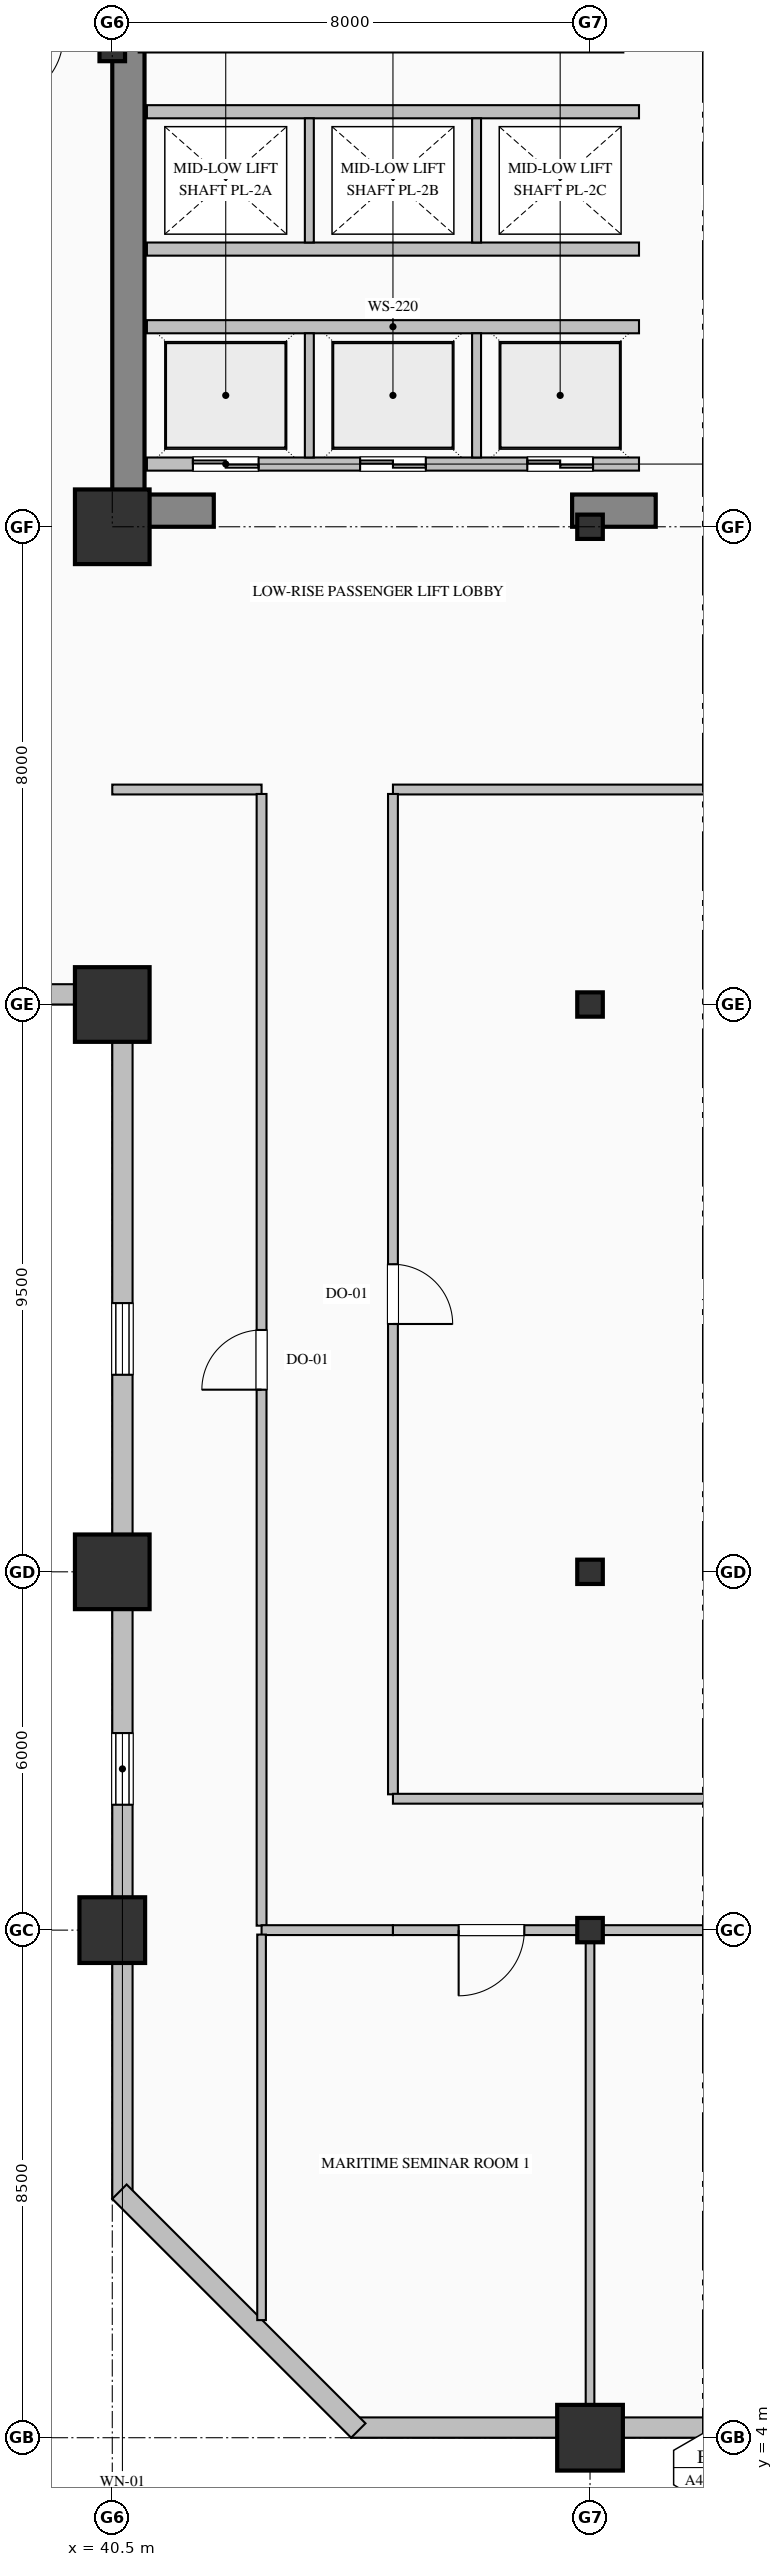
"""IFC4 building model, lengths in metres.
Left out: names, types, materials, properties, quantities, classifications, styles, units other than length and angle.
Written with IfcOpenShell. Run it as: python <this file> out.ifc"""

import sys

from ifc_helpers import new_model, si_unit, direction, frame, frame_2d, origin, origin_2d, place, context, subcontext, project, spatial, rectangle, hollow_rectangle, i_section, extrude, element, fill, save


model = new_model("IFC4")
c1 = context("Model", 3, precision=1e-05, world=origin(), true_north=direction((0.0, 1.0)))
c2 = subcontext(c1, "Body", "Model", "MODEL_VIEW")
j1 = project(units=[si_unit("LENGTHUNIT", "METRE"), si_unit("PLANEANGLEUNIT", "RADIAN")], contexts=[c1])
p1 = place(None, origin())
s1 = spatial("IfcSite", under=j1, at=p1, CompositionType="ELEMENT")
p2 = place(p1, origin())
s2 = spatial("IfcBuilding", under=s1, at=p2, CompositionType="ELEMENT")
p3 = place(p2, frame((0.0, 0.0, 44.2)))
s3 = spatial("IfcBuildingStorey", under=s2, at=p3, CompositionType="ELEMENT", Elevation=44.2)
p4 = place(p3, frame((40.77, 36.54, 0.0), z_axis=(0.0, 0.0, 1.0), x_axis=(0.0, 1.0, 0.0)))
e1 = element("IfcWall", 1, at=p4, inside=s3, PredefinedType="SHEAR", context=c2, shape_type="SweptSolid", body=[
    extrude(rectangle(XDim=7.86, YDim=0.54, at=frame_2d((3.93, 0.0))), origin(), (0.0, 0.0, 1.0), 3.75),
])
p5 = place(p3, frame((40.5, 36.27, 0.0), z_axis=(0.0, 0.0, 1.0), x_axis=(1.0, 0.0, 0.0)))
e2 = element("IfcWall", 2, at=p5, inside=s3, PredefinedType="SHEAR", context=c2, shape_type="SweptSolid", body=[
    extrude(rectangle(XDim=1.7, YDim=0.54, at=frame_2d((0.85, 0.0))), origin(), (0.0, 0.0, 1.0), 3.75),
])
p6 = place(p3, frame((48.2, 36.27, 0.0), z_axis=(0.0, 0.0, 1.0), x_axis=(1.0, 0.0, 0.0)))
e3 = element("IfcWall", 3, at=p6, inside=s3, PredefinedType="SHEAR", context=c2, shape_type="SweptSolid", body=[
    extrude(rectangle(XDim=1.4, YDim=0.54, at=frame_2d((0.7, 0.0))), origin(), (0.0, 0.0, 1.0), 3.75),
])
p7 = place(p3, frame((40.5, 12.5, 0.0), z_axis=(0.0, 0.0, 1.0), x_axis=(1.0, 0.0, 0.0)))
e4 = element("IfcColumn", 4, at=p7, inside=s3, PredefinedType="COLUMN", context=c2, shape_type="SweptSolid", body=[
    extrude(hollow_rectangle(XDim=1.1, YDim=1.1, WallThickness=0.04, at=origin_2d()), origin(), (0.0, 0.0, 1.0), 4.0),
])
for number, where, z_axis, x_axis in (
    (5, (40.5, 18.5, 0.0), (0.0, 0.0, 1.0), (1.0, 0.0, 0.0)),
    (6, (40.5, 28.0, 0.0), (0.0, 0.0, 1.0), (1.0, 0.0, 0.0)),
    (7, (40.5, 36.0, 0.0), (0.0, 0.0, 1.0), (1.0, 0.0, 0.0)),
):
    element("IfcColumn", number, at=place(p3, frame(where, z_axis=z_axis, x_axis=x_axis)), inside=s3, PredefinedType="COLUMN", context=c2, shape_type="SweptSolid", body=[
        extrude(hollow_rectangle(XDim=1.25, YDim=1.25, WallThickness=0.045, at=origin_2d()), origin(), (0.0, 0.0, 1.0), 4.0),
    ])
p8 = place(p3, frame((40.5, 44.0, 0.0), z_axis=(0.0, 0.0, 1.0), x_axis=(1.0, 0.0, 0.0)))
e8 = element("IfcColumn", 8, at=p8, inside=s3, PredefinedType="COLUMN", context=c2, shape_type="SweptSolid", body=[
    extrude(i_section(OverallWidth=0.407, OverallDepth=0.428, WebThickness=0.02, FlangeThickness=0.035, FilletRadius=0.022, at=origin_2d()), origin(), (0.0, 0.0, 1.0), 4.0),
])
p9 = place(p3, frame((48.5, 4.0, 0.0), z_axis=(0.0, 0.0, 1.0), x_axis=(1.0, 0.0, 0.0)))
e9 = element("IfcColumn", 9, at=p9, inside=s3, PredefinedType="COLUMN", context=c2, shape_type="SweptSolid", body=[
    extrude(hollow_rectangle(XDim=1.1, YDim=1.1, WallThickness=0.04, at=origin_2d()), origin(), (0.0, 0.0, 1.0), 4.0),
])
for number, where, z_axis, x_axis in (
    (10, (48.5, 12.5, 0.0), (0.0, 0.0, 1.0), (1.0, 0.0, 0.0)),
    (11, (48.5, 18.5, 0.0), (0.0, 0.0, 1.0), (1.0, 0.0, 0.0)),
    (12, (48.5, 28.0, 0.0), (0.0, 0.0, 1.0), (1.0, 0.0, 0.0)),
    (13, (48.5, 36.0, 0.0), (0.0, 0.0, 1.0), (1.0, 0.0, 0.0)),
):
    element("IfcColumn", number, at=place(p3, frame(where, z_axis=z_axis, x_axis=x_axis)), inside=s3, PredefinedType="COLUMN", context=c2, shape_type="SweptSolid", body=[
        extrude(i_section(OverallWidth=0.407, OverallDepth=0.428, WebThickness=0.02, FlangeThickness=0.035, FilletRadius=0.022, at=origin_2d()), origin(), (0.0, 0.0, 1.0), 4.0),
    ])
p10 = place(p3, frame((40.67, 8.0, 0.0), z_axis=(0.0, 0.0, 1.0), x_axis=(0.0, 1.0, 0.0)))
e14 = element("IfcWall", 14, at=p10, inside=s3, PredefinedType="SOLIDWALL", context=c2, shape_type="SweptSolid", body=[
    extrude(rectangle(XDim=20.34, YDim=0.34, at=frame_2d((10.17, 0.0))), origin(), (0.0, 0.0, 1.0), 3.05),
])
p11 = place(p10, frame((6.6, 0.0, 0.7)))
e15 = element("IfcOpeningElement", 15, at=p11, cuts=e14, PredefinedType="OPENING", context=c2, shape_type="SweptSolid", body=[
    extrude(rectangle(XDim=1.2, YDim=1.85, at=frame_2d((0.6, 0.925))), frame((0.0, 0.18, 0.0), z_axis=(0.0, -1.0, 0.0), x_axis=(1.0, 0.0, 0.0)), (0.0, 0.0, 1.0), 0.36),
])
p12 = place(p10, frame((13.8, 0.0, 0.7)))
e16 = element("IfcOpeningElement", 16, at=p12, cuts=e14, PredefinedType="OPENING", context=c2, shape_type="SweptSolid", body=[
    extrude(rectangle(XDim=1.2, YDim=1.85, at=frame_2d((0.6, 0.925))), frame((0.0, 0.18, 0.0), z_axis=(0.0, -1.0, 0.0), x_axis=(1.0, 0.0, 0.0)), (0.0, 0.0, 1.0), 0.36),
])
p13 = place(p3, frame((40.52, 28.17, 0.0), z_axis=(0.0, 0.0, 1.0), x_axis=(-1.0, 0.0, 0.0)))
e17 = element("IfcWall", 17, at=p13, inside=s3, PredefinedType="SOLIDWALL", context=c2, shape_type="SweptSolid", body=[
    extrude(rectangle(XDim=36.52, YDim=0.34, at=frame_2d((18.26, 0.0))), origin(), (0.0, 0.0, 1.0), 3.05),
])
p14 = place(p13, frame((10.2, 0.0, 0.7)))
e18 = element("IfcOpeningElement", 18, at=p14, cuts=e17, PredefinedType="OPENING", context=c2, shape_type="SweptSolid", body=[
    extrude(rectangle(XDim=1.2, YDim=1.85, at=frame_2d((0.6, 0.925))), frame((0.0, 0.18, 0.0), z_axis=(0.0, -1.0, 0.0), x_axis=(1.0, 0.0, 0.0)), (0.0, 0.0, 1.0), 0.36),
])
p15 = place(p13, frame((13.8, 0.0, 0.7)))
e19 = element("IfcOpeningElement", 19, at=p15, cuts=e17, PredefinedType="OPENING", context=c2, shape_type="SweptSolid", body=[
    extrude(rectangle(XDim=1.2, YDim=1.85, at=frame_2d((0.6, 0.925))), frame((0.0, 0.18, 0.0), z_axis=(0.0, -1.0, 0.0), x_axis=(1.0, 0.0, 0.0)), (0.0, 0.0, 1.0), 0.36),
])
p16 = place(p13, frame((17.4, 0.0, 0.7)))
e20 = element("IfcOpeningElement", 20, at=p16, cuts=e17, PredefinedType="OPENING", context=c2, shape_type="SweptSolid", body=[
    extrude(rectangle(XDim=1.2, YDim=1.85, at=frame_2d((0.6, 0.925))), frame((0.0, 0.18, 0.0), z_axis=(0.0, -1.0, 0.0), x_axis=(1.0, 0.0, 0.0)), (0.0, 0.0, 1.0), 0.36),
])
p17 = place(p13, frame((21.0, 0.0, 0.7)))
e21 = element("IfcOpeningElement", 21, at=p17, cuts=e17, PredefinedType="OPENING", context=c2, shape_type="SweptSolid", body=[
    extrude(rectangle(XDim=1.2, YDim=1.85, at=frame_2d((0.6, 0.925))), frame((0.0, 0.18, 0.0), z_axis=(0.0, -1.0, 0.0), x_axis=(1.0, 0.0, 0.0)), (0.0, 0.0, 1.0), 0.36),
])
p18 = place(p13, frame((28.2, 0.0, 0.7)))
e22 = element("IfcOpeningElement", 22, at=p18, cuts=e17, PredefinedType="OPENING", context=c2, shape_type="SweptSolid", body=[
    extrude(rectangle(XDim=1.2, YDim=1.85, at=frame_2d((0.6, 0.925))), frame((0.0, 0.18, 0.0), z_axis=(0.0, -1.0, 0.0), x_axis=(1.0, 0.0, 0.0)), (0.0, 0.0, 1.0), 0.36),
])
p19 = place(p3, frame((60.0, 4.17, 0.0), z_axis=(0.0, 0.0, 1.0), x_axis=(-1.0, 0.0, 0.0)))
e23 = element("IfcWall", 23, at=p19, inside=s3, PredefinedType="SOLIDWALL", context=c2, shape_type="SweptSolid", body=[
    extrude(rectangle(XDim=15.5, YDim=0.34, at=frame_2d((7.75, 0.0))), origin(), (0.0, 0.0, 1.0), 3.25),
])
p20 = place(p19, frame((6.15, 0.0, 0.85)))
e24 = element("IfcOpeningElement", 24, at=p20, cuts=e23, PredefinedType="OPENING", context=c2, shape_type="SweptSolid", body=[
    extrude(rectangle(XDim=2.1, YDim=2.05, at=frame_2d((1.05, 1.025))), frame((0.0, 0.18, 0.0), z_axis=(0.0, -1.0, 0.0), x_axis=(1.0, 0.0, 0.0)), (0.0, 0.0, 1.0), 0.36),
])
p21 = place(p3, frame((44.62, 4.12, 0.0), z_axis=(0.0, 0.0, 1.0), x_axis=(-0.707106781187, 0.707106781187, 0.0)))
e25 = element("IfcWall", 25, at=p21, inside=s3, PredefinedType="SOLIDWALL", context=c2, shape_type="SweptSolid", body=[
    extrude(rectangle(XDim=5.657, YDim=0.34, at=frame_2d((2.828, 0.0))), origin(), (0.0, 0.0, 1.0), 3.75),
])
p22 = place(p3, frame((49.32, 37.05, 0.0), z_axis=(0.0, 0.0, 1.0), x_axis=(-1.0, 0.0, 0.0)))
e26 = element("IfcWall", 26, at=p22, inside=s3, PredefinedType="PARTITIONING", context=c2, shape_type="SweptSolid", body=[
    extrude(rectangle(XDim=8.24, YDim=0.22, at=frame_2d((4.12, 0.0))), origin(), (0.0, 0.0, 1.0), 3.75),
])
p23 = place(p22, frame((6.37, 0.0, 0.0)))
e27 = element("IfcOpeningElement", 27, at=p23, cuts=e26, PredefinedType="OPENING", context=c2, shape_type="SweptSolid", body=[
    extrude(rectangle(XDim=1.1, YDim=2.2, at=frame_2d((0.55, 1.1))), frame((0.0, 0.12, 0.0), z_axis=(0.0, -1.0, 0.0), x_axis=(1.0, 0.0, 0.0)), (0.0, 0.0, 1.0), 0.24),
])
p24 = place(p22, frame((3.57, 0.0, 0.0)))
e28 = element("IfcOpeningElement", 28, at=p24, cuts=e26, PredefinedType="OPENING", context=c2, shape_type="SweptSolid", body=[
    extrude(rectangle(XDim=1.1, YDim=2.2, at=frame_2d((0.55, 1.1))), frame((0.0, 0.12, 0.0), z_axis=(0.0, -1.0, 0.0), x_axis=(1.0, 0.0, 0.0)), (0.0, 0.0, 1.0), 0.24),
])
p25 = place(p22, frame((0.77, 0.0, 0.0)))
e29 = element("IfcOpeningElement", 29, at=p25, cuts=e26, PredefinedType="OPENING", context=c2, shape_type="SweptSolid", body=[
    extrude(rectangle(XDim=1.1, YDim=2.2, at=frame_2d((0.55, 1.1))), frame((0.0, 0.12, 0.0), z_axis=(0.0, -1.0, 0.0), x_axis=(1.0, 0.0, 0.0)), (0.0, 0.0, 1.0), 0.24),
])
p26 = place(p3, frame((41.08, 39.35, 0.0), z_axis=(0.0, 0.0, 1.0), x_axis=(1.0, 0.0, 0.0)))
e30 = element("IfcWall", 30, at=p26, inside=s3, PredefinedType="PARTITIONING", context=c2, shape_type="SweptSolid", body=[
    extrude(rectangle(XDim=8.24, YDim=0.22, at=frame_2d((4.12, 0.0))), origin(), (0.0, 0.0, 1.0), 3.75),
])
for number, where, z_axis, x_axis in (
    (31, (43.8, 37.16, 0.0), (0.0, 0.0, 1.0), (0.0, 1.0, 0.0)),
    (32, (46.6, 37.16, 0.0), (0.0, 0.0, 1.0), (0.0, 1.0, 0.0)),
):
    element("IfcWall", number, at=place(p3, frame(where, z_axis=z_axis, x_axis=x_axis)), inside=s3, PredefinedType="PARTITIONING", context=c2, shape_type="SweptSolid", body=[
        extrude(rectangle(XDim=2.08, YDim=0.15, at=frame_2d((1.04, 0.0))), origin(), (0.0, 0.0, 1.0), 3.75),
    ])
for number, where, z_axis, x_axis in (
    (33, (49.32, 40.65, 0.0), (0.0, 0.0, 1.0), (-1.0, 0.0, 0.0)),
    (34, (41.08, 42.95, 0.0), (0.0, 0.0, 1.0), (1.0, 0.0, 0.0)),
):
    element("IfcWall", number, at=place(p3, frame(where, z_axis=z_axis, x_axis=x_axis)), inside=s3, PredefinedType="PARTITIONING", context=c2, shape_type="SweptSolid", body=[
        extrude(rectangle(XDim=8.24, YDim=0.22, at=frame_2d((4.12, 0.0))), origin(), (0.0, 0.0, 1.0), 3.75),
    ])
for number, where, z_axis, x_axis in (
    (35, (43.8, 40.76, 0.0), (0.0, 0.0, 1.0), (0.0, 1.0, 0.0)),
    (36, (46.6, 40.76, 0.0), (0.0, 0.0, 1.0), (0.0, 1.0, 0.0)),
):
    element("IfcWall", number, at=place(p3, frame(where, z_axis=z_axis, x_axis=x_axis)), inside=s3, PredefinedType="PARTITIONING", context=c2, shape_type="SweptSolid", body=[
        extrude(rectangle(XDim=2.08, YDim=0.15, at=frame_2d((1.04, 0.0))), origin(), (0.0, 0.0, 1.0), 3.75),
    ])
p27 = place(p3, frame((56.5, 31.6, 0.0), z_axis=(0.0, 0.0, 1.0), x_axis=(-1.0, 0.0, 0.0)))
e37 = element("IfcWall", 37, at=p27, inside=s3, PredefinedType="PARTITIONING", context=c2, shape_type="SweptSolid", body=[
    extrude(rectangle(XDim=11.3, YDim=0.165, at=frame_2d((5.65, 0.0))), origin(), (0.0, 0.0, 1.0), 3.75),
])
p28 = place(p3, frame((43.0, 31.6, 0.0), z_axis=(0.0, 0.0, 1.0), x_axis=(-1.0, 0.0, 0.0)))
e38 = element("IfcWall", 38, at=p28, inside=s3, PredefinedType="PARTITIONING", context=c2, shape_type="SweptSolid", body=[
    extrude(rectangle(XDim=2.5, YDim=0.165, at=frame_2d((1.25, 0.0))), origin(), (0.0, 0.0, 1.0), 3.75),
])
p29 = place(p3, frame((45.2, 31.525, 0.0), z_axis=(0.0, 0.0, 1.0), x_axis=(0.0, -1.0, 0.0)))
e39 = element("IfcWall", 39, at=p29, inside=s3, PredefinedType="PARTITIONING", context=c2, shape_type="SweptSolid", body=[
    extrude(rectangle(XDim=16.751, YDim=0.165, at=frame_2d((8.375, 0.0))), origin(), (0.0, 0.0, 1.0), 3.75),
])
p30 = place(p29, frame((7.875, 0.0, 0.0)))
e40 = element("IfcOpeningElement", 40, at=p30, cuts=e39, PredefinedType="OPENING", context=c2, shape_type="SweptSolid", body=[
    extrude(rectangle(XDim=1.0, YDim=2.15, at=frame_2d((0.5, 1.075))), frame((0.0, 0.093, 0.0), z_axis=(0.0, -1.0, 0.0), x_axis=(1.0, 0.0, 0.0)), (0.0, 0.0, 1.0), 0.185),
])
p31 = place(p3, frame((43.0, 12.574, 0.0), z_axis=(0.0, 0.0, 1.0), x_axis=(0.0, 1.0, 0.0)))
e41 = element("IfcWall", 41, at=p31, inside=s3, PredefinedType="PARTITIONING", context=c2, shape_type="SweptSolid", body=[
    extrude(rectangle(XDim=18.951, YDim=0.165, at=frame_2d((9.476, 0.0))), origin(), (0.0, 0.0, 1.0), 3.75),
])
p32 = place(p31, frame((8.976, 0.0, 0.0)))
e42 = element("IfcOpeningElement", 42, at=p32, cuts=e41, PredefinedType="OPENING", context=c2, shape_type="SweptSolid", body=[
    extrude(rectangle(XDim=1.0, YDim=2.15, at=frame_2d((0.5, 1.075))), frame((0.0, 0.093, 0.0), z_axis=(0.0, -1.0, 0.0), x_axis=(1.0, 0.0, 0.0)), (0.0, 0.0, 1.0), 0.185),
])
p33 = place(p3, frame((45.2, 12.5, 0.0), z_axis=(0.0, 0.0, 1.0), x_axis=(-1.0, 0.0, 0.0)))
e43 = element("IfcWall", 43, at=p33, inside=s3, PredefinedType="PARTITIONING", context=c2, shape_type="SweptSolid", body=[
    extrude(rectangle(XDim=2.2, YDim=0.165, at=frame_2d((1.1, 0.0))), origin(), (0.0, 0.0, 1.0), 3.042),
])
p34 = place(p3, frame((45.2, 14.7, 0.0), z_axis=(0.0, 0.0, 1.0), x_axis=(1.0, 0.0, 0.0)))
e44 = element("IfcWall", 44, at=p34, inside=s3, PredefinedType="PARTITIONING", context=c2, shape_type="SweptSolid", body=[
    extrude(rectangle(XDim=16.3, YDim=0.165, at=frame_2d((8.15, 0.0))), origin(), (0.0, 0.0, 1.0), 3.75),
])
p35 = place(p3, frame((48.5, 12.5, 0.0), z_axis=(0.0, 0.0, 1.0), x_axis=(-1.0, 0.0, 0.0)))
e45 = element("IfcWall", 45, at=p35, inside=s3, PredefinedType="PARTITIONING", context=c2, shape_type="SweptSolid", body=[
    extrude(rectangle(XDim=3.3, YDim=0.165, at=frame_2d((1.65, 0.0))), origin(), (0.0, 0.0, 1.0), 3.042),
])
p36 = place(p35, frame((1.1, 0.0, 0.0)))
e46 = element("IfcOpeningElement", 46, at=p36, cuts=e45, PredefinedType="OPENING", context=c2, shape_type="SweptSolid", body=[
    extrude(rectangle(XDim=1.1, YDim=2.2, at=frame_2d((0.55, 1.1))), frame((0.0, 0.093, 0.0), z_axis=(0.0, -1.0, 0.0), x_axis=(1.0, 0.0, 0.0)), (0.0, 0.0, 1.0), 0.185),
])
p37 = place(p3, frame((56.5, 12.5, 0.0), z_axis=(0.0, 0.0, 1.0), x_axis=(-1.0, 0.0, 0.0)))
e47 = element("IfcWall", 47, at=p37, inside=s3, PredefinedType="PARTITIONING", context=c2, shape_type="SweptSolid", body=[
    extrude(rectangle(XDim=8.0, YDim=0.165, at=frame_2d((4.0, 0.0))), origin(), (0.0, 0.0, 1.0), 3.042),
])
p38 = place(p37, frame((3.45, 0.0, 0.0)))
e48 = element("IfcOpeningElement", 48, at=p38, cuts=e47, PredefinedType="OPENING", context=c2, shape_type="SweptSolid", body=[
    extrude(rectangle(XDim=1.1, YDim=2.2, at=frame_2d((0.55, 1.1))), frame((0.0, 0.093, 0.0), z_axis=(0.0, -1.0, 0.0), x_axis=(1.0, 0.0, 0.0)), (0.0, 0.0, 1.0), 0.185),
])
p39 = place(p3, frame((43.0, 12.426, 0.0), z_axis=(0.0, 0.0, 1.0), x_axis=(0.0, -1.0, 0.0)))
e49 = element("IfcWall", 49, at=p39, inside=s3, PredefinedType="PARTITIONING", context=c2, shape_type="SweptSolid", body=[
    extrude(rectangle(XDim=6.456, YDim=0.145, at=frame_2d((3.228, 0.0))), origin(), (0.0, 0.0, 1.0), 3.75),
])
p40 = place(p3, frame((48.5, 12.426, 0.0), z_axis=(0.0, 0.0, 1.0), x_axis=(0.0, -1.0, 0.0)))
e50 = element("IfcWall", 50, at=p40, inside=s3, PredefinedType="PARTITIONING", context=c2, shape_type="SweptSolid", body=[
    extrude(rectangle(XDim=8.094, YDim=0.145, at=frame_2d((4.047, 0.0))), origin(), (0.0, 0.0, 1.0), 3.042),
])
p41 = place(p11, origin())
e51 = element("IfcWindow", 51, at=p41, inside=s3, PartitioningType="DOUBLE_PANEL_VERTICAL", PredefinedType="WINDOW", context=c2, shape_type="SweptSolid", body=[
    extrude(rectangle(XDim=1.2, YDim=1.85, at=frame_2d((0.6, 0.925))), frame((0.0, 0.15, 0.0), z_axis=(0.0, -1.0, 0.0), x_axis=(1.0, 0.0, 0.0)), (0.0, 0.0, 1.0), 0.06),
])
fill(e15, e51)
p42 = place(p12, origin())
e52 = element("IfcWindow", 52, at=p42, inside=s3, PartitioningType="DOUBLE_PANEL_VERTICAL", PredefinedType="WINDOW", context=c2, shape_type="SweptSolid", body=[
    extrude(rectangle(XDim=1.2, YDim=1.85, at=frame_2d((0.6, 0.925))), frame((0.0, 0.15, 0.0), z_axis=(0.0, -1.0, 0.0), x_axis=(1.0, 0.0, 0.0)), (0.0, 0.0, 1.0), 0.06),
])
fill(e16, e52)
p43 = place(p23, origin())
e53 = element("IfcDoor", 53, at=p43, inside=s3, OperationType="DOUBLE_DOOR_SLIDING", PredefinedType="DOOR", context=c2, shape_type="SweptSolid", body=[
    extrude(rectangle(XDim=1.1, YDim=2.2, at=frame_2d((0.55, 1.1))), frame((0.0, 0.025, 0.0), z_axis=(0.0, -1.0, 0.0), x_axis=(1.0, 0.0, 0.0)), (0.0, 0.0, 1.0), 0.05),
])
fill(e27, e53)
p44 = place(p24, origin())
e54 = element("IfcDoor", 54, at=p44, inside=s3, OperationType="DOUBLE_DOOR_SLIDING", PredefinedType="DOOR", context=c2, shape_type="SweptSolid", body=[
    extrude(rectangle(XDim=1.1, YDim=2.2, at=frame_2d((0.55, 1.1))), frame((0.0, 0.025, 0.0), z_axis=(0.0, -1.0, 0.0), x_axis=(1.0, 0.0, 0.0)), (0.0, 0.0, 1.0), 0.05),
])
fill(e28, e54)
p45 = place(p25, origin())
e55 = element("IfcDoor", 55, at=p45, inside=s3, OperationType="DOUBLE_DOOR_SLIDING", PredefinedType="DOOR", context=c2, shape_type="SweptSolid", body=[
    extrude(rectangle(XDim=1.1, YDim=2.2, at=frame_2d((0.55, 1.1))), frame((0.0, 0.025, 0.0), z_axis=(0.0, -1.0, 0.0), x_axis=(1.0, 0.0, 0.0)), (0.0, 0.0, 1.0), 0.05),
])
fill(e29, e55)
p46 = place(p30, origin())
e56 = element("IfcDoor", 56, at=p46, inside=s3, OperationType="SINGLE_SWING_RIGHT", PredefinedType="DOOR", context=c2, shape_type="SweptSolid", body=[
    extrude(rectangle(XDim=1.0, YDim=2.15, at=frame_2d((0.5, 1.075))), frame((0.0, 0.025, 0.0), z_axis=(0.0, -1.0, 0.0), x_axis=(1.0, 0.0, 0.0)), (0.0, 0.0, 1.0), 0.05),
])
fill(e40, e56)
p47 = place(p32, origin())
e57 = element("IfcDoor", 57, at=p47, inside=s3, OperationType="SINGLE_SWING_LEFT", PredefinedType="DOOR", context=c2, shape_type="SweptSolid", body=[
    extrude(rectangle(XDim=1.0, YDim=2.15, at=frame_2d((0.5, 1.075))), frame((0.0, 0.025, 0.0), z_axis=(0.0, -1.0, 0.0), x_axis=(1.0, 0.0, 0.0)), (0.0, 0.0, 1.0), 0.05),
])
fill(e42, e57)
p48 = place(p36, origin())
e58 = element("IfcDoor", 58, at=p48, inside=s3, OperationType="SINGLE_SWING_RIGHT", PredefinedType="DOOR", context=c2, shape_type="SweptSolid", body=[
    extrude(rectangle(XDim=1.1, YDim=2.2, at=frame_2d((0.55, 1.1))), frame((0.0, 0.025, 0.0), z_axis=(0.0, -1.0, 0.0), x_axis=(1.0, 0.0, 0.0)), (0.0, 0.0, 1.0), 0.05),
])
fill(e46, e58)
save(model, sys.argv[1])
